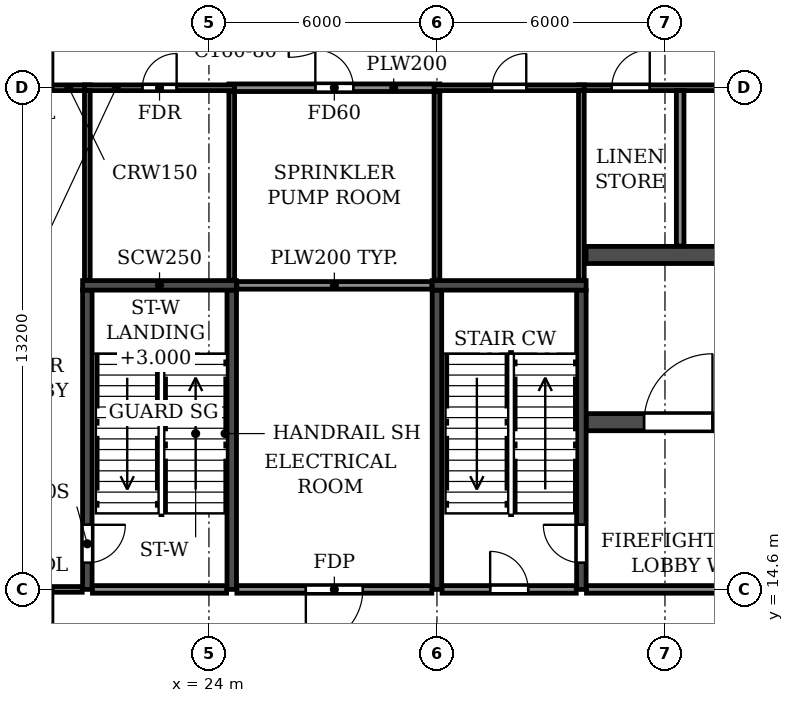
"""IFC4 building model, lengths in metres.
Left out: names, types, materials, properties, quantities, classifications, styles, units other than length and angle.
Written with IfcOpenShell. Run it as: python <this file> out.ifc"""

import sys

from ifc_helpers import new_model, si_unit, direction, frame, frame_2d, origin, place, context, subcontext, project, spatial, rectangle, extrude, element, fill, save


model = new_model("IFC4")
c1 = context("Model", 3, precision=1e-05, world=origin(), true_north=direction((0.0, 1.0)))
c2 = subcontext(c1, "Body", "Model", "MODEL_VIEW")
j1 = project(units=[si_unit("LENGTHUNIT", "METRE"), si_unit("PLANEANGLEUNIT", "RADIAN")], contexts=[c1])
p1 = place(None, origin())
s1 = spatial("IfcSite", under=j1, at=p1, CompositionType="ELEMENT")
p2 = place(p1, origin())
s2 = spatial("IfcBuilding", under=s1, at=p2, CompositionType="ELEMENT")
p3 = place(p2, origin())
s3 = spatial("IfcBuildingStorey", under=s2, at=p3, CompositionType="ELEMENT", Elevation=0.0)
p4 = place(p3, frame((33.925, 19.0, 0.0), z_axis=(0.0, 0.0, 1.0), x_axis=(1.0, 0.0, 0.0)))
e1 = element("IfcWall", 1, at=p4, inside=s3, PredefinedType="SOLIDWALL", context=c2, shape_type="SweptSolid", body=[
    extrude(rectangle(XDim=34.15, YDim=0.45, at=frame_2d((17.075, 0.0))), origin(), (0.0, 0.0, 1.0), 4.2),
])
p5 = place(p4, frame((16.175, 0.0, 0.0)))
e2 = element("IfcOpeningElement", 2, at=p5, cuts=e1, PredefinedType="OPENING", context=c2, shape_type="SweptSolid", body=[
    extrude(rectangle(XDim=1.8, YDim=2.1, at=frame_2d((0.9, 1.05))), frame((0.0, 0.235, 0.0), z_axis=(0.0, -1.0, 0.0), x_axis=(1.0, 0.0, 0.0)), (0.0, 0.0, 1.0), 0.47),
])
p6 = place(p4, frame((1.525, 0.0, 0.0)))
e3 = element("IfcOpeningElement", 3, at=p6, cuts=e1, PredefinedType="OPENING", context=c2, shape_type="SweptSolid", body=[
    extrude(rectangle(XDim=1.8, YDim=2.1, at=frame_2d((0.9, 1.05))), frame((0.0, 0.235, 0.0), z_axis=(0.0, -1.0, 0.0), x_axis=(1.0, 0.0, 0.0)), (0.0, 0.0, 1.0), 0.47),
])
p7 = place(p4, frame((8.725, 0.0, 0.0)))
e4 = element("IfcOpeningElement", 4, at=p7, cuts=e1, PredefinedType="OPENING", context=c2, shape_type="SweptSolid", body=[
    extrude(rectangle(XDim=1.1, YDim=2.1, at=frame_2d((0.55, 1.05))), frame((0.0, 0.235, 0.0), z_axis=(0.0, -1.0, 0.0), x_axis=(1.0, 0.0, 0.0)), (0.0, 0.0, 1.0), 0.47),
])
p8 = place(p4, frame((11.325, 0.0, 0.0)))
e5 = element("IfcOpeningElement", 5, at=p8, cuts=e1, PredefinedType="OPENING", context=c2, shape_type="SweptSolid", body=[
    extrude(rectangle(XDim=1.1, YDim=2.1, at=frame_2d((0.55, 1.05))), frame((0.0, 0.235, 0.0), z_axis=(0.0, -1.0, 0.0), x_axis=(1.0, 0.0, 0.0)), (0.0, 0.0, 1.0), 0.47),
])
p9 = place(p4, frame((13.925, 0.0, 0.0)))
e6 = element("IfcOpeningElement", 6, at=p9, cuts=e1, PredefinedType="OPENING", context=c2, shape_type="SweptSolid", body=[
    extrude(rectangle(XDim=1.1, YDim=2.1, at=frame_2d((0.55, 1.05))), frame((0.0, 0.235, 0.0), z_axis=(0.0, -1.0, 0.0), x_axis=(1.0, 0.0, 0.0)), (0.0, 0.0, 1.0), 0.47),
])
p10 = place(p4, frame((19.125, 0.0, 0.0)))
e7 = element("IfcOpeningElement", 7, at=p10, cuts=e1, PredefinedType="OPENING", context=c2, shape_type="SweptSolid", body=[
    extrude(rectangle(XDim=1.1, YDim=2.1, at=frame_2d((0.55, 1.05))), frame((0.0, 0.235, 0.0), z_axis=(0.0, -1.0, 0.0), x_axis=(1.0, 0.0, 0.0)), (0.0, 0.0, 1.0), 0.47),
])
p11 = place(p4, frame((21.725, 0.0, 0.0)))
e8 = element("IfcOpeningElement", 8, at=p11, cuts=e1, PredefinedType="OPENING", context=c2, shape_type="SweptSolid", body=[
    extrude(rectangle(XDim=1.1, YDim=2.1, at=frame_2d((0.55, 1.05))), frame((0.0, 0.235, 0.0), z_axis=(0.0, -1.0, 0.0), x_axis=(1.0, 0.0, 0.0)), (0.0, 0.0, 1.0), 0.47),
])
p12 = place(p4, frame((24.325, 0.0, 0.0)))
e9 = element("IfcOpeningElement", 9, at=p12, cuts=e1, PredefinedType="OPENING", context=c2, shape_type="SweptSolid", body=[
    extrude(rectangle(XDim=1.1, YDim=2.1, at=frame_2d((0.55, 1.05))), frame((0.0, 0.235, 0.0), z_axis=(0.0, -1.0, 0.0), x_axis=(1.0, 0.0, 0.0)), (0.0, 0.0, 1.0), 0.47),
])
p13 = place(p4, frame((30.825, 0.0, 0.0)))
e10 = element("IfcOpeningElement", 10, at=p13, cuts=e1, PredefinedType="OPENING", context=c2, shape_type="SweptSolid", body=[
    extrude(rectangle(XDim=1.8, YDim=2.1, at=frame_2d((0.9, 1.05))), frame((0.0, 0.235, 0.0), z_axis=(0.0, -1.0, 0.0), x_axis=(1.0, 0.0, 0.0)), (0.0, 0.0, 1.0), 0.47),
])
p14 = place(p3, frame((33.925, 23.4, 0.0), z_axis=(0.0, 0.0, 1.0), x_axis=(1.0, 0.0, 0.0)))
e11 = element("IfcWall", 11, at=p14, inside=s3, PredefinedType="SOLIDWALL", context=c2, shape_type="SweptSolid", body=[
    extrude(rectangle(XDim=34.15, YDim=0.45, at=frame_2d((17.075, 0.0))), origin(), (0.0, 0.0, 1.0), 4.2),
])
p15 = place(p14, frame((16.175, 0.0, 0.0)))
e12 = element("IfcOpeningElement", 12, at=p15, cuts=e11, PredefinedType="OPENING", context=c2, shape_type="SweptSolid", body=[
    extrude(rectangle(XDim=1.8, YDim=2.1, at=frame_2d((0.9, 1.05))), frame((0.0, 0.235, 0.0), z_axis=(0.0, -1.0, 0.0), x_axis=(1.0, 0.0, 0.0)), (0.0, 0.0, 1.0), 0.47),
])
p16 = place(p14, frame((11.025, 0.0, 0.0)))
e13 = element("IfcOpeningElement", 13, at=p16, cuts=e11, PredefinedType="OPENING", context=c2, shape_type="SweptSolid", body=[
    extrude(rectangle(XDim=1.1, YDim=2.1, at=frame_2d((0.55, 1.05))), frame((0.0, 0.235, 0.0), z_axis=(0.0, -1.0, 0.0), x_axis=(1.0, 0.0, 0.0)), (0.0, 0.0, 1.0), 0.47),
])
p17 = place(p14, frame((19.425, 0.0, 0.0)))
e14 = element("IfcOpeningElement", 14, at=p17, cuts=e11, PredefinedType="OPENING", context=c2, shape_type="SweptSolid", body=[
    extrude(rectangle(XDim=1.1, YDim=2.1, at=frame_2d((0.55, 1.05))), frame((0.0, 0.235, 0.0), z_axis=(0.0, -1.0, 0.0), x_axis=(1.0, 0.0, 0.0)), (0.0, 0.0, 1.0), 0.47),
])
p18 = place(p14, frame((22.025, 0.0, 0.0)))
e15 = element("IfcOpeningElement", 15, at=p18, cuts=e11, PredefinedType="OPENING", context=c2, shape_type="SweptSolid", body=[
    extrude(rectangle(XDim=1.1, YDim=2.1, at=frame_2d((0.55, 1.05))), frame((0.0, 0.235, 0.0), z_axis=(0.0, -1.0, 0.0), x_axis=(1.0, 0.0, 0.0)), (0.0, 0.0, 1.0), 0.47),
])
p19 = place(p14, frame((24.625, 0.0, 0.0)))
e16 = element("IfcOpeningElement", 16, at=p19, cuts=e11, PredefinedType="OPENING", context=c2, shape_type="SweptSolid", body=[
    extrude(rectangle(XDim=1.1, YDim=2.1, at=frame_2d((0.55, 1.05))), frame((0.0, 0.235, 0.0), z_axis=(0.0, -1.0, 0.0), x_axis=(1.0, 0.0, 0.0)), (0.0, 0.0, 1.0), 0.47),
])
p20 = place(p14, frame((29.825, 0.0, 0.0)))
e17 = element("IfcOpeningElement", 17, at=p20, cuts=e11, PredefinedType="OPENING", context=c2, shape_type="SweptSolid", body=[
    extrude(rectangle(XDim=1.1, YDim=2.1, at=frame_2d((0.55, 1.05))), frame((0.0, 0.235, 0.0), z_axis=(0.0, -1.0, 0.0), x_axis=(1.0, 0.0, 0.0)), (0.0, 0.0, 1.0), 0.47),
])
p21 = place(p14, frame((32.425, 0.0, 0.0)))
e18 = element("IfcOpeningElement", 18, at=p21, cuts=e11, PredefinedType="OPENING", context=c2, shape_type="SweptSolid", body=[
    extrude(rectangle(XDim=1.1, YDim=2.1, at=frame_2d((0.55, 1.05))), frame((0.0, 0.235, 0.0), z_axis=(0.0, -1.0, 0.0), x_axis=(1.0, 0.0, 0.0)), (0.0, 0.0, 1.0), 0.47),
])
p22 = place(p3, frame((30.0, 14.6, 0.0), z_axis=(0.0, 0.0, 1.0), x_axis=(0.0, 1.0, 0.0)))
e19 = element("IfcWall", 19, at=p22, inside=s3, PredefinedType="SOLIDWALL", context=c2, shape_type="SweptSolid", body=[
    extrude(rectangle(XDim=7.875, YDim=0.25, at=frame_2d((3.938, 0.0))), origin(), (0.0, 0.0, 1.0), 4.2),
])
p23 = place(p3, frame((33.8, 14.6, 0.0), z_axis=(0.0, 0.0, 1.0), x_axis=(0.0, 1.0, 0.0)))
e20 = element("IfcWall", 20, at=p23, inside=s3, PredefinedType="SOLIDWALL", context=c2, shape_type="SweptSolid", body=[
    extrude(rectangle(XDim=7.875, YDim=0.25, at=frame_2d((3.938, 0.0))), origin(), (0.0, 0.0, 1.0), 4.2),
])
p24 = place(p23, frame((0.7, 0.0, 0.0)))
e21 = element("IfcOpeningElement", 21, at=p24, cuts=e20, PredefinedType="OPENING", context=c2, shape_type="SweptSolid", body=[
    extrude(rectangle(XDim=1.0, YDim=2.1, at=frame_2d((0.5, 1.05))), frame((0.0, 0.135, 0.0), z_axis=(0.0, -1.0, 0.0), x_axis=(1.0, 0.0, 0.0)), (0.0, 0.0, 1.0), 0.27),
])
p25 = place(p3, frame((29.875, 22.6, 0.0), z_axis=(0.0, 0.0, 1.0), x_axis=(1.0, 0.0, 0.0)))
e22 = element("IfcWall", 22, at=p25, inside=s3, PredefinedType="SOLIDWALL", context=c2, shape_type="SweptSolid", body=[
    extrude(rectangle(XDim=4.05, YDim=0.25, at=frame_2d((2.025, 0.0))), origin(), (0.0, 0.0, 1.0), 4.2),
])
p26 = place(p3, frame((20.8, 14.6, 0.0), z_axis=(0.0, 0.0, 1.0), x_axis=(0.0, 1.0, 0.0)))
e23 = element("IfcWall", 23, at=p26, inside=s3, PredefinedType="SOLIDWALL", context=c2, shape_type="SweptSolid", body=[
    extrude(rectangle(XDim=7.875, YDim=0.25, at=frame_2d((3.938, 0.0))), origin(), (0.0, 0.0, 1.0), 4.2),
])
p27 = place(p26, frame((0.7, 0.0, 0.0)))
e24 = element("IfcOpeningElement", 24, at=p27, cuts=e23, PredefinedType="OPENING", context=c2, shape_type="SweptSolid", body=[
    extrude(rectangle(XDim=1.0, YDim=2.1, at=frame_2d((0.5, 1.05))), frame((0.0, 0.135, 0.0), z_axis=(0.0, -1.0, 0.0), x_axis=(1.0, 0.0, 0.0)), (0.0, 0.0, 1.0), 0.27),
])
p28 = place(p3, frame((24.6, 14.6, 0.0), z_axis=(0.0, 0.0, 1.0), x_axis=(0.0, 1.0, 0.0)))
e25 = element("IfcWall", 25, at=p28, inside=s3, PredefinedType="SOLIDWALL", context=c2, shape_type="SweptSolid", body=[
    extrude(rectangle(XDim=7.875, YDim=0.25, at=frame_2d((3.938, 0.0))), origin(), (0.0, 0.0, 1.0), 4.2),
])
p29 = place(p3, frame((20.675, 22.6, 0.0), z_axis=(0.0, 0.0, 1.0), x_axis=(1.0, 0.0, 0.0)))
e26 = element("IfcWall", 26, at=p29, inside=s3, PredefinedType="SOLIDWALL", context=c2, shape_type="SweptSolid", body=[
    extrude(rectangle(XDim=4.05, YDim=0.25, at=frame_2d((2.025, 0.0))), origin(), (0.0, 0.0, 1.0), 4.2),
])
p30 = place(p3, frame((0.0, 14.6, 0.0), z_axis=(0.0, 0.0, 1.0), x_axis=(1.0, 0.0, 0.0)))
e27 = element("IfcWall", 27, at=p30, inside=s3, PredefinedType="PARTITIONING", context=c2, shape_type="SweptSolid", body=[
    extrude(rectangle(XDim=20.665, YDim=0.15, at=frame_2d((10.333, 0.0))), origin(), (0.0, 0.0, 1.0), 4.2),
])
p31 = place(p30, frame((18.9, 0.0, 0.0)))
e28 = element("IfcOpeningElement", 28, at=p31, cuts=e27, PredefinedType="OPENING", context=c2, shape_type="SweptSolid", body=[
    extrude(rectangle(XDim=1.0, YDim=2.1, at=frame_2d((0.5, 1.05))), frame((0.0, 0.085, 0.0), z_axis=(0.0, -1.0, 0.0), x_axis=(1.0, 0.0, 0.0)), (0.0, 0.0, 1.0), 0.17),
])
p32 = place(p3, frame((17.9, 27.8, 0.0), z_axis=(0.0, 0.0, 1.0), x_axis=(1.0, 0.0, 0.0)))
e29 = element("IfcWall", 29, at=p32, inside=s3, PredefinedType="PARTITIONING", context=c2, shape_type="SweptSolid", body=[
    extrude(rectangle(XDim=2.975, YDim=0.15, at=frame_2d((1.488, 0.0))), origin(), (0.0, 0.0, 1.0), 4.2),
])
p33 = place(p32, frame((1.0, 0.0, 0.0)))
e30 = element("IfcOpeningElement", 30, at=p33, cuts=e29, PredefinedType="OPENING", context=c2, shape_type="SweptSolid", body=[
    extrude(rectangle(XDim=1.0, YDim=2.1, at=frame_2d((0.5, 1.05))), frame((0.0, 0.085, 0.0), z_axis=(0.0, -1.0, 0.0), x_axis=(1.0, 0.0, 0.0)), (0.0, 0.0, 1.0), 0.17),
])
p34 = place(p3, frame((33.725, 27.8, 0.0), z_axis=(0.0, 0.0, 1.0), x_axis=(1.0, 0.0, 0.0)))
e31 = element("IfcWall", 31, at=p34, inside=s3, PredefinedType="PARTITIONING", context=c2, shape_type="SweptSolid", body=[
    extrude(rectangle(XDim=10.575, YDim=0.15, at=frame_2d((5.288, 0.0))), origin(), (0.0, 0.0, 1.0), 4.2),
])
p35 = place(p34, frame((0.875, 0.0, 0.0)))
e32 = element("IfcOpeningElement", 32, at=p35, cuts=e31, PredefinedType="OPENING", context=c2, shape_type="SweptSolid", body=[
    extrude(rectangle(XDim=1.0, YDim=2.1, at=frame_2d((0.5, 1.05))), frame((0.0, 0.085, 0.0), z_axis=(0.0, -1.0, 0.0), x_axis=(1.0, 0.0, 0.0)), (0.0, 0.0, 1.0), 0.17),
])
p36 = place(p34, frame((6.075, 0.0, 0.0)))
e33 = element("IfcOpeningElement", 33, at=p36, cuts=e31, PredefinedType="OPENING", context=c2, shape_type="SweptSolid", body=[
    extrude(rectangle(XDim=1.0, YDim=2.1, at=frame_2d((0.5, 1.05))), frame((0.0, 0.085, 0.0), z_axis=(0.0, -1.0, 0.0), x_axis=(1.0, 0.0, 0.0)), (0.0, 0.0, 1.0), 0.17),
])
p37 = place(p3, frame((24.735, 14.6, 0.0), z_axis=(0.0, 0.0, 1.0), x_axis=(1.0, 0.0, 0.0)))
e34 = element("IfcWall", 34, at=p37, inside=s3, PredefinedType="PARTITIONING", context=c2, shape_type="SweptSolid", body=[
    extrude(rectangle(XDim=5.13, YDim=0.2, at=frame_2d((2.565, 0.0))), origin(), (0.0, 0.0, 1.0), 4.2),
])
p38 = place(p37, frame((1.815, 0.0, 0.0)))
e35 = element("IfcOpeningElement", 35, at=p38, cuts=e34, PredefinedType="OPENING", context=c2, shape_type="SweptSolid", body=[
    extrude(rectangle(XDim=1.5, YDim=2.1, at=frame_2d((0.75, 1.05))), frame((0.0, 0.11, 0.0), z_axis=(0.0, -1.0, 0.0), x_axis=(1.0, 0.0, 0.0)), (0.0, 0.0, 1.0), 0.22),
])
p39 = place(p3, frame((24.735, 22.6, 0.0), z_axis=(0.0, 0.0, 1.0), x_axis=(1.0, 0.0, 0.0)))
e36 = element("IfcWall", 36, at=p39, inside=s3, PredefinedType="PARTITIONING", context=c2, shape_type="SweptSolid", body=[
    extrude(rectangle(XDim=5.13, YDim=0.2, at=frame_2d((2.565, 0.0))), origin(), (0.0, 0.0, 1.0), 4.2),
])
p40 = place(p3, frame((24.525, 27.8, 0.0), z_axis=(0.0, 0.0, 1.0), x_axis=(1.0, 0.0, 0.0)))
e37 = element("IfcWall", 37, at=p40, inside=s3, PredefinedType="PARTITIONING", context=c2, shape_type="SweptSolid", body=[
    extrude(rectangle(XDim=5.55, YDim=0.2, at=frame_2d((2.775, 0.0))), origin(), (0.0, 0.0, 1.0), 4.2),
])
p41 = place(p40, frame((2.275, 0.0, 0.0)))
e38 = element("IfcOpeningElement", 38, at=p41, cuts=e37, PredefinedType="OPENING", context=c2, shape_type="SweptSolid", body=[
    extrude(rectangle(XDim=1.0, YDim=2.1, at=frame_2d((0.5, 1.05))), frame((0.0, 0.11, 0.0), z_axis=(0.0, -1.0, 0.0), x_axis=(1.0, 0.0, 0.0)), (0.0, 0.0, 1.0), 0.22),
])
p42 = place(p3, frame((36.4, 23.635, 0.0), z_axis=(0.0, 0.0, 1.0), x_axis=(0.0, 1.0, 0.0)))
e39 = element("IfcWall", 39, at=p42, inside=s3, PredefinedType="PARTITIONING", context=c2, shape_type="SweptSolid", body=[
    extrude(rectangle(XDim=4.09, YDim=0.2, at=frame_2d((2.045, 0.0))), origin(), (0.0, 0.0, 1.0), 4.2),
])
p43 = place(p3, frame((20.725, 27.8, 0.0), z_axis=(0.0, 0.0, 1.0), x_axis=(1.0, 0.0, 0.0)))
e40 = element("IfcWall", 40, at=p43, inside=s3, PredefinedType="PARTITIONING", context=c2, shape_type="SweptSolid", body=[
    extrude(rectangle(XDim=3.95, YDim=0.15, at=frame_2d((1.975, 0.0))), origin(), (0.0, 0.0, 1.0), 4.2),
])
p44 = place(p43, frame((1.525, 0.0, 0.0)))
e41 = element("IfcOpeningElement", 41, at=p44, cuts=e40, PredefinedType="OPENING", context=c2, shape_type="SweptSolid", body=[
    extrude(rectangle(XDim=0.9, YDim=2.1, at=frame_2d((0.45, 1.05))), frame((0.0, 0.085, 0.0), z_axis=(0.0, -1.0, 0.0), x_axis=(1.0, 0.0, 0.0)), (0.0, 0.0, 1.0), 0.17),
])
p45 = place(p3, frame((29.925, 27.8, 0.0), z_axis=(0.0, 0.0, 1.0), x_axis=(1.0, 0.0, 0.0)))
e42 = element("IfcWall", 42, at=p45, inside=s3, PredefinedType="PARTITIONING", context=c2, shape_type="SweptSolid", body=[
    extrude(rectangle(XDim=3.95, YDim=0.15, at=frame_2d((1.975, 0.0))), origin(), (0.0, 0.0, 1.0), 4.2),
])
p46 = place(p45, frame((1.525, 0.0, 0.0)))
e43 = element("IfcOpeningElement", 43, at=p46, cuts=e42, PredefinedType="OPENING", context=c2, shape_type="SweptSolid", body=[
    extrude(rectangle(XDim=0.9, YDim=2.1, at=frame_2d((0.45, 1.05))), frame((0.0, 0.085, 0.0), z_axis=(0.0, -1.0, 0.0), x_axis=(1.0, 0.0, 0.0)), (0.0, 0.0, 1.0), 0.17),
])
p47 = place(p3, frame((20.8, 22.735, 0.0), z_axis=(0.0, 0.0, 1.0), x_axis=(0.0, 1.0, 0.0)))
e44 = element("IfcWall", 44, at=p47, inside=s3, PredefinedType="PARTITIONING", context=c2, shape_type="SweptSolid", body=[
    extrude(rectangle(XDim=4.99, YDim=0.15, at=frame_2d((2.495, 0.0))), origin(), (0.0, 0.0, 1.0), 4.2),
])
for number, where, z_axis, x_axis in (
    (45, (24.6, 22.735, 0.0), (0.0, 0.0, 1.0), (0.0, 1.0, 0.0)),
    (46, (30.0, 22.735, 0.0), (0.0, 0.0, 1.0), (0.0, 1.0, 0.0)),
):
    element("IfcWall", number, at=place(p3, frame(where, z_axis=z_axis, x_axis=x_axis)), inside=s3, PredefinedType="PARTITIONING", context=c2, shape_type="SweptSolid", body=[
        extrude(rectangle(XDim=4.965, YDim=0.15, at=frame_2d((2.482, 0.0))), origin(), (0.0, 0.0, 1.0), 4.2),
    ])
p48 = place(p3, frame((33.8, 22.735, 0.0), z_axis=(0.0, 0.0, 1.0), x_axis=(0.0, 1.0, 0.0)))
e47 = element("IfcWall", 47, at=p48, inside=s3, PredefinedType="PARTITIONING", context=c2, shape_type="SweptSolid", body=[
    extrude(rectangle(XDim=4.99, YDim=0.15, at=frame_2d((2.495, 0.0))), origin(), (0.0, 0.0, 1.0), 4.2),
])
p49 = place(p3, frame((33.935, 14.6, 0.0), z_axis=(0.0, 0.0, 1.0), x_axis=(1.0, 0.0, 0.0)))
e48 = element("IfcWall", 48, at=p49, inside=s3, PredefinedType="PARTITIONING", context=c2, shape_type="SweptSolid", body=[
    extrude(rectangle(XDim=8.065, YDim=0.2, at=frame_2d((4.032, 0.0))), origin(), (0.0, 0.0, 1.0), 4.2),
])
p50 = place(p3, frame((20.935, 14.6, 0.0), z_axis=(0.0, 0.0, 1.0), x_axis=(1.0, 0.0, 0.0)))
e49 = element("IfcWall", 49, at=p50, inside=s3, PredefinedType="PARTITIONING", context=c2, shape_type="SweptSolid", body=[
    extrude(rectangle(XDim=3.53, YDim=0.2, at=frame_2d((1.765, 0.0))), origin(), (0.0, 0.0, 1.0), 4.2),
])
p51 = place(p3, frame((30.135, 14.6, 0.0), z_axis=(0.0, 0.0, 1.0), x_axis=(1.0, 0.0, 0.0)))
e50 = element("IfcWall", 50, at=p51, inside=s3, PredefinedType="PARTITIONING", context=c2, shape_type="SweptSolid", body=[
    extrude(rectangle(XDim=3.53, YDim=0.2, at=frame_2d((1.765, 0.0))), origin(), (0.0, 0.0, 1.0), 4.2),
])
p52 = place(p51, frame((1.265, 0.0, 0.0)))
e51 = element("IfcOpeningElement", 51, at=p52, cuts=e50, PredefinedType="OPENING", context=c2, shape_type="SweptSolid", body=[
    extrude(rectangle(XDim=1.0, YDim=2.1, at=frame_2d((0.5, 1.05))), frame((0.0, 0.11, 0.0), z_axis=(0.0, -1.0, 0.0), x_axis=(1.0, 0.0, 0.0)), (0.0, 0.0, 1.0), 0.22),
])
p53 = place(p33, origin())
e52 = element("IfcDoor", 52, at=p53, inside=s3, OperationType="SINGLE_SWING_RIGHT", PredefinedType="DOOR", context=c2, shape_type="SweptSolid", body=[
    extrude(rectangle(XDim=1.0, YDim=2.1, at=frame_2d((0.5, 1.05))), frame((0.0, 0.025, 0.0), z_axis=(0.0, -1.0, 0.0), x_axis=(1.0, 0.0, 0.0)), (0.0, 0.0, 1.0), 0.05),
])
fill(e30, e52)
p54 = place(p44, origin())
e53 = element("IfcDoor", 53, at=p54, inside=s3, OperationType="SINGLE_SWING_RIGHT", PredefinedType="DOOR", context=c2, shape_type="SweptSolid", body=[
    extrude(rectangle(XDim=0.9, YDim=2.1, at=frame_2d((0.45, 1.05))), frame((0.0, 0.025, 0.0), z_axis=(0.0, -1.0, 0.0), x_axis=(1.0, 0.0, 0.0)), (0.0, 0.0, 1.0), 0.05),
])
fill(e41, e53)
p55 = place(p41, origin())
e54 = element("IfcDoor", 54, at=p55, inside=s3, OperationType="SINGLE_SWING_LEFT", PredefinedType="DOOR", context=c2, shape_type="SweptSolid", body=[
    extrude(rectangle(XDim=1.0, YDim=2.1, at=frame_2d((0.5, 1.05))), frame((0.0, 0.025, 0.0), z_axis=(0.0, -1.0, 0.0), x_axis=(1.0, 0.0, 0.0)), (0.0, 0.0, 1.0), 0.05),
])
fill(e38, e54)
p56 = place(p46, origin())
e55 = element("IfcDoor", 55, at=p56, inside=s3, OperationType="SINGLE_SWING_RIGHT", PredefinedType="DOOR", context=c2, shape_type="SweptSolid", body=[
    extrude(rectangle(XDim=0.9, YDim=2.1, at=frame_2d((0.45, 1.05))), frame((0.0, 0.025, 0.0), z_axis=(0.0, -1.0, 0.0), x_axis=(1.0, 0.0, 0.0)), (0.0, 0.0, 1.0), 0.05),
])
fill(e43, e55)
p57 = place(p35, origin())
e56 = element("IfcDoor", 56, at=p57, inside=s3, OperationType="SINGLE_SWING_RIGHT", PredefinedType="DOOR", context=c2, shape_type="SweptSolid", body=[
    extrude(rectangle(XDim=1.0, YDim=2.1, at=frame_2d((0.5, 1.05))), frame((0.0, 0.025, 0.0), z_axis=(0.0, -1.0, 0.0), x_axis=(1.0, 0.0, 0.0)), (0.0, 0.0, 1.0), 0.05),
])
fill(e32, e56)
p58 = place(p31, frame((1.0, 0.0, 0.0), z_axis=(0.0, 0.0, 1.0), x_axis=(-1.0, 0.0, 0.0)))
e57 = element("IfcDoor", 57, at=p58, inside=s3, OperationType="SINGLE_SWING_LEFT", PredefinedType="DOOR", context=c2, shape_type="SweptSolid", body=[
    extrude(rectangle(XDim=1.0, YDim=2.1, at=frame_2d((0.5, 1.05))), frame((0.0, 0.025, 0.0), z_axis=(0.0, -1.0, 0.0), x_axis=(1.0, 0.0, 0.0)), (0.0, 0.0, 1.0), 0.05),
])
fill(e28, e57)
p59 = place(p38, frame((1.5, 0.0, 0.0), z_axis=(0.0, 0.0, 1.0), x_axis=(-1.0, 0.0, 0.0)))
e58 = element("IfcDoor", 58, at=p59, inside=s3, OperationType="DOUBLE_DOOR_SINGLE_SWING", PredefinedType="DOOR", context=c2, shape_type="SweptSolid", body=[
    extrude(rectangle(XDim=1.5, YDim=2.1, at=frame_2d((0.75, 1.05))), frame((0.0, 0.025, 0.0), z_axis=(0.0, -1.0, 0.0), x_axis=(1.0, 0.0, 0.0)), (0.0, 0.0, 1.0), 0.05),
])
fill(e35, e58)
p60 = place(p52, origin())
e59 = element("IfcDoor", 59, at=p60, inside=s3, OperationType="SINGLE_SWING_LEFT", PredefinedType="DOOR", context=c2, shape_type="SweptSolid", body=[
    extrude(rectangle(XDim=1.0, YDim=2.1, at=frame_2d((0.5, 1.05))), frame((0.0, 0.025, 0.0), z_axis=(0.0, -1.0, 0.0), x_axis=(1.0, 0.0, 0.0)), (0.0, 0.0, 1.0), 0.05),
])
fill(e51, e59)
p61 = place(p24, origin())
e60 = element("IfcDoor", 60, at=p61, inside=s3, OperationType="SINGLE_SWING_RIGHT", PredefinedType="DOOR", context=c2, shape_type="SweptSolid", body=[
    extrude(rectangle(XDim=1.0, YDim=2.1, at=frame_2d((0.5, 1.05))), frame((0.0, 0.025, 0.0), z_axis=(0.0, -1.0, 0.0), x_axis=(1.0, 0.0, 0.0)), (0.0, 0.0, 1.0), 0.05),
])
fill(e21, e60)
p62 = place(p6, origin())
e61 = element("IfcDoor", 61, at=p62, inside=s3, OperationType="DOUBLE_DOOR_SINGLE_SWING", PredefinedType="DOOR", context=c2, shape_type="SweptSolid", body=[
    extrude(rectangle(XDim=1.8, YDim=2.1, at=frame_2d((0.9, 1.05))), frame((0.0, 0.025, 0.0), z_axis=(0.0, -1.0, 0.0), x_axis=(1.0, 0.0, 0.0)), (0.0, 0.0, 1.0), 0.05),
])
fill(e3, e61)
p63 = place(p27, frame((1.0, 0.0, 0.0), z_axis=(0.0, 0.0, 1.0), x_axis=(-1.0, 0.0, 0.0)))
e62 = element("IfcDoor", 62, at=p63, inside=s3, OperationType="SINGLE_SWING_LEFT", PredefinedType="DOOR", context=c2, shape_type="SweptSolid", body=[
    extrude(rectangle(XDim=1.0, YDim=2.1, at=frame_2d((0.5, 1.05))), frame((0.0, 0.025, 0.0), z_axis=(0.0, -1.0, 0.0), x_axis=(1.0, 0.0, 0.0)), (0.0, 0.0, 1.0), 0.05),
])
fill(e24, e62)
save(model, sys.argv[1])
